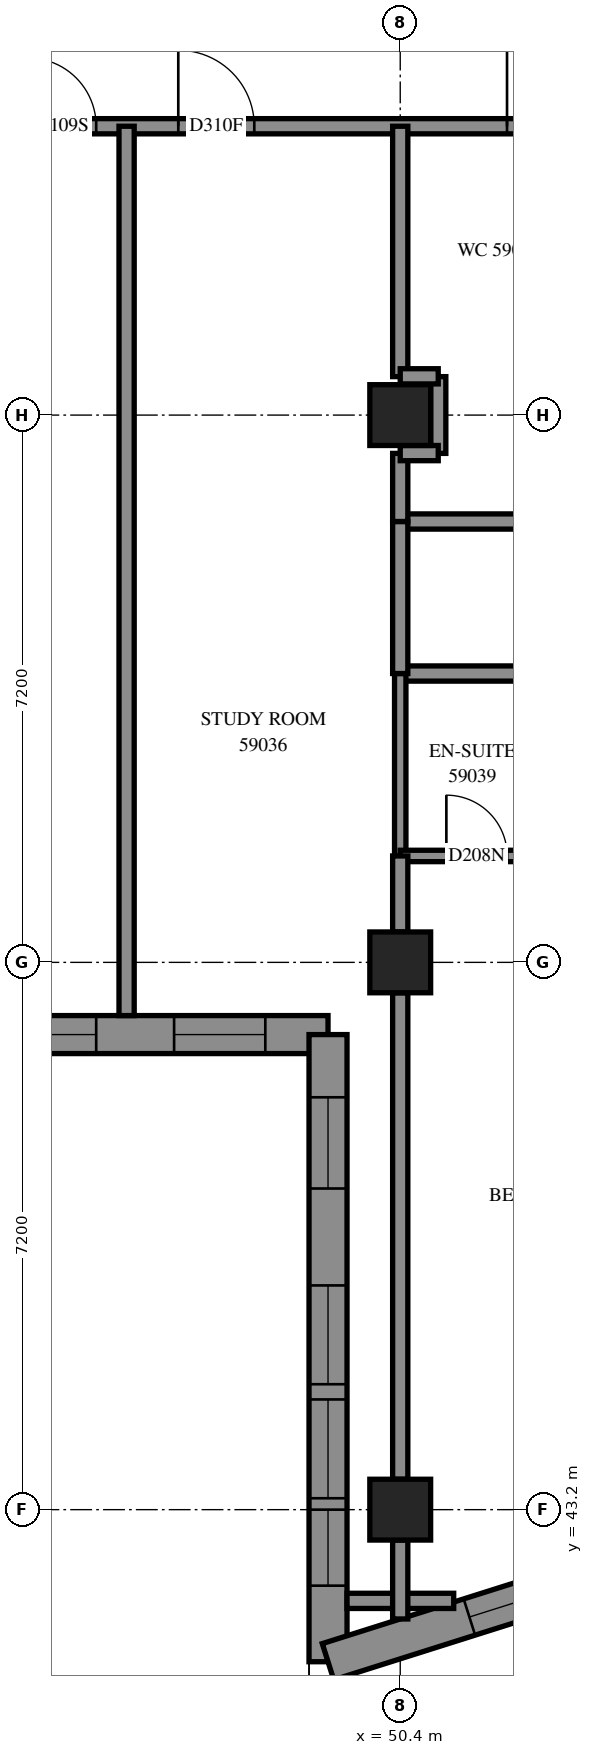
"""IFC4 building model, lengths in metres.
Left out: names, types, materials, properties, quantities, classifications, styles, units other than length and angle.
Written with IfcOpenShell. Run it as: python <this file> out.ifc"""

import sys

from ifc_helpers import new_model, si_unit, direction, frame, frame_2d, origin, origin_2d, place, context, subcontext, project, spatial, polyline, rectangle, outline, extrude, element, fill, save


model = new_model("IFC4")
c1 = context("Model", 3, precision=1e-05, world=origin(), true_north=direction((0.0, 1.0)))
c2 = subcontext(c1, "Body", "Model", "MODEL_VIEW")
j1 = project(units=[si_unit("LENGTHUNIT", "METRE"), si_unit("PLANEANGLEUNIT", "RADIAN")], contexts=[c1])
p1 = place(None, origin())
s1 = spatial("IfcSite", under=j1, at=p1, CompositionType="ELEMENT")
p2 = place(p1, origin())
s2 = spatial("IfcBuilding", under=s1, at=p2, CompositionType="ELEMENT")
p3 = place(p2, frame((0.0, 0.0, 216.8)))
s3 = spatial("IfcBuildingStorey", under=s2, at=p3, CompositionType="ELEMENT", Elevation=216.8)
for number, where, z_axis, x_axis in (
    (1, (50.4, 43.2, 0.0), (0.0, 0.0, 1.0), (1.0, 0.0, 0.0)),
    (2, (50.4, 50.4, 0.0), (0.0, 0.0, 1.0), (1.0, 0.0, 0.0)),
    (3, (50.4, 57.6, 0.0), (0.0, 0.0, 1.0), (1.0, 0.0, 0.0)),
):
    element("IfcColumn", number, at=place(p3, frame(where, z_axis=z_axis, x_axis=x_axis)), inside=s3, PredefinedType="COLUMN", context=c2, shape_type="SweptSolid", body=[
        extrude(rectangle(XDim=0.8, YDim=0.8, at=origin_2d()), origin(), (0.0, 0.0, 1.0), 3.1),
    ])
p4 = place(p3, frame((42.25, 49.45, 0.0), z_axis=(0.0, 0.0, 1.0), x_axis=(1.0, 0.0, 0.0)))
e4 = element("IfcWall", 4, at=p4, inside=s3, PredefinedType="SOLIDWALL", context=c2, shape_type="SweptSolid", body=[
    extrude(outline(polyline([(-0.25, -0.25), (6.95, -0.25), (7.45, 0.25), (0.25, 0.25), (-0.25, -0.25)])), origin(), (0.0, 0.0, 1.0), 3.1),
])
p5 = place(p4, frame((1.35, 0.0, 0.45)))
e5 = element("IfcOpeningElement", 5, at=p5, cuts=e4, PredefinedType="OPENING", context=c2, shape_type="SweptSolid", body=[
    extrude(rectangle(XDim=1.3, YDim=2.5, at=frame_2d((0.65, 1.25))), frame((0.0, 0.26, 0.0), z_axis=(0.0, -1.0, 0.0), x_axis=(1.0, 0.0, 0.0)), (0.0, 0.0, 1.0), 0.52),
])
p6 = place(p4, frame((2.85, 0.0, 0.45)))
e6 = element("IfcOpeningElement", 6, at=p6, cuts=e4, PredefinedType="OPENING", context=c2, shape_type="SweptSolid", body=[
    extrude(rectangle(XDim=1.3, YDim=2.5, at=frame_2d((0.65, 1.25))), frame((0.0, 0.26, 0.0), z_axis=(0.0, -1.0, 0.0), x_axis=(1.0, 0.0, 0.0)), (0.0, 0.0, 1.0), 0.52),
])
p7 = place(p4, frame((5.175, 0.0, 0.45)))
e7 = element("IfcOpeningElement", 7, at=p7, cuts=e4, PredefinedType="OPENING", context=c2, shape_type="SweptSolid", body=[
    extrude(rectangle(XDim=1.2, YDim=2.5, at=frame_2d((0.6, 1.25))), frame((0.0, 0.26, 0.0), z_axis=(0.0, -1.0, 0.0), x_axis=(1.0, 0.0, 0.0)), (0.0, 0.0, 1.0), 0.52),
])
p8 = place(p3, frame((49.45, 49.45, 0.0), z_axis=(0.0, 0.0, 1.0), x_axis=(0.0, -1.0, 0.0)))
e8 = element("IfcWall", 8, at=p8, inside=s3, PredefinedType="SOLIDWALL", context=c2, shape_type="SweptSolid", body=[
    extrude(outline(polyline([(0.25, -0.25), (8.592, -0.25), (7.91, 0.25), (-0.25, 0.25), (0.25, -0.25)])), origin(), (0.0, 0.0, 1.0), 3.1),
])
p9 = place(p8, frame((3.3, 0.0, 0.45)))
e9 = element("IfcOpeningElement", 9, at=p9, cuts=e8, PredefinedType="OPENING", context=c2, shape_type="SweptSolid", body=[
    extrude(rectangle(XDim=1.3, YDim=2.5, at=frame_2d((0.65, 1.25))), frame((0.0, 0.26, 0.0), z_axis=(0.0, -1.0, 0.0), x_axis=(1.0, 0.0, 0.0)), (0.0, 0.0, 1.0), 0.52),
])
p10 = place(p8, frame((4.8, 0.0, 0.45)))
e10 = element("IfcOpeningElement", 10, at=p10, cuts=e8, PredefinedType="OPENING", context=c2, shape_type="SweptSolid", body=[
    extrude(rectangle(XDim=1.3, YDim=2.5, at=frame_2d((0.65, 1.25))), frame((0.0, 0.26, 0.0), z_axis=(0.0, -1.0, 0.0), x_axis=(1.0, 0.0, 0.0)), (0.0, 0.0, 1.0), 0.52),
])
p11 = place(p8, frame((0.825, 0.0, 0.45)))
e11 = element("IfcOpeningElement", 11, at=p11, cuts=e8, PredefinedType="OPENING", context=c2, shape_type="SweptSolid", body=[
    extrude(rectangle(XDim=1.2, YDim=2.5, at=frame_2d((0.6, 1.25))), frame((0.0, 0.26, 0.0), z_axis=(0.0, -1.0, 0.0), x_axis=(1.0, 0.0, 0.0)), (0.0, 0.0, 1.0), 0.52),
])
p12 = place(p8, frame((6.25, 0.0, 0.45)))
e12 = element("IfcOpeningElement", 12, at=p12, cuts=e8, PredefinedType="OPENING", context=c2, shape_type="SweptSolid", body=[
    extrude(rectangle(XDim=1.0, YDim=2.5, at=frame_2d((0.5, 1.25))), frame((0.0, 0.26, 0.0), z_axis=(0.0, -1.0, 0.0), x_axis=(1.0, 0.0, 0.0)), (0.0, 0.0, 1.0), 0.52),
])
p13 = place(p3, frame((49.45, 41.199, 0.0), z_axis=(0.0, 0.0, 1.0), x_axis=(0.9534843061, 0.3014426612, 0.0)))
e13 = element("IfcWall", 13, at=p13, inside=s3, PredefinedType="SOLIDWALL", context=c2, shape_type="SweptSolid", body=[
    extrude(outline(polyline([(-0.341, -0.25), (3.447, -0.25), (3.563, 0.25), (0.341, 0.25), (-0.341, -0.25)])), origin(), (0.0, 0.0, 1.0), 3.1),
])
p14 = place(p13, frame((1.951, 0.0, 0.45)))
e14 = element("IfcOpeningElement", 14, at=p14, cuts=e13, PredefinedType="OPENING", context=c2, shape_type="SweptSolid", body=[
    extrude(rectangle(XDim=1.2, YDim=2.5, at=frame_2d((0.6, 1.25))), frame((0.0, 0.26, 0.0), z_axis=(0.0, -1.0, 0.0), x_axis=(1.0, 0.0, 0.0)), (0.0, 0.0, 1.0), 0.52),
])
p15 = place(p3, frame((36.0, 61.4, 0.0), z_axis=(0.0, 0.0, 1.0), x_axis=(1.0, 0.0, 0.0)))
e15 = element("IfcWall", 15, at=p15, inside=s3, PredefinedType="PARTITIONING", context=c2, shape_type="SweptSolid", body=[
    extrude(rectangle(XDim=17.0, YDim=0.2, at=frame_2d((8.5, 0.0))), origin(), (0.0, 0.0, 1.0), 3.1),
])
p16 = place(p15, frame((2.3, 0.0, 0.0)))
e16 = element("IfcOpeningElement", 16, at=p16, cuts=e15, PredefinedType="OPENING", context=c2, shape_type="SweptSolid", body=[
    extrude(rectangle(XDim=0.9, YDim=2.1, at=frame_2d((0.45, 1.05))), frame((0.0, 0.11, 0.0), z_axis=(0.0, -1.0, 0.0), x_axis=(1.0, 0.0, 0.0)), (0.0, 0.0, 1.0), 0.22),
])
p17 = place(p15, frame((4.107, 0.0, 0.0)))
e17 = element("IfcOpeningElement", 17, at=p17, cuts=e15, PredefinedType="OPENING", context=c2, shape_type="SweptSolid", body=[
    extrude(rectangle(XDim=1.0, YDim=2.1, at=frame_2d((0.5, 1.05))), frame((0.0, 0.11, 0.0), z_axis=(0.0, -1.0, 0.0), x_axis=(1.0, 0.0, 0.0)), (0.0, 0.0, 1.0), 0.22),
])
p18 = place(p15, frame((9.5, 0.0, 0.0)))
e18 = element("IfcOpeningElement", 18, at=p18, cuts=e15, PredefinedType="OPENING", context=c2, shape_type="SweptSolid", body=[
    extrude(rectangle(XDim=0.9, YDim=2.1, at=frame_2d((0.45, 1.05))), frame((0.0, 0.11, 0.0), z_axis=(0.0, -1.0, 0.0), x_axis=(1.0, 0.0, 0.0)), (0.0, 0.0, 1.0), 0.22),
])
p19 = place(p15, frame((11.48, 0.0, 0.0)))
e19 = element("IfcOpeningElement", 19, at=p19, cuts=e15, PredefinedType="OPENING", context=c2, shape_type="SweptSolid", body=[
    extrude(rectangle(XDim=1.0, YDim=2.1, at=frame_2d((0.5, 1.05))), frame((0.0, 0.11, 0.0), z_axis=(0.0, -1.0, 0.0), x_axis=(1.0, 0.0, 0.0)), (0.0, 0.0, 1.0), 0.22),
])
p20 = place(p15, frame((15.805, 0.0, 0.0)))
e20 = element("IfcOpeningElement", 20, at=p20, cuts=e15, PredefinedType="OPENING", context=c2, shape_type="SweptSolid", body=[
    extrude(rectangle(XDim=1.0, YDim=2.1, at=frame_2d((0.5, 1.05))), frame((0.0, 0.11, 0.0), z_axis=(0.0, -1.0, 0.0), x_axis=(1.0, 0.0, 0.0)), (0.0, 0.0, 1.0), 0.22),
])
p21 = place(p3, frame((46.8, 49.7, 0.0), z_axis=(0.0, 0.0, 1.0), x_axis=(0.0, 1.0, 0.0)))
e21 = element("IfcWall", 21, at=p21, inside=s3, PredefinedType="PARTITIONING", context=c2, shape_type="SweptSolid", body=[
    extrude(rectangle(XDim=11.7, YDim=0.2, at=frame_2d((5.85, 0.0))), origin(), (0.0, 0.0, 1.0), 3.1),
])
p22 = place(p3, frame((50.4, 43.6, 0.0), z_axis=(0.0, 0.0, 1.0), x_axis=(0.0, 1.0, 0.0)))
e22 = element("IfcWall", 22, at=p22, inside=s3, PredefinedType="PARTITIONING", context=c2, shape_type="SweptSolid", body=[
    extrude(rectangle(XDim=6.4, YDim=0.2, at=frame_2d((3.2, 0.0))), origin(), (0.0, 0.0, 1.0), 2.6),
])
p23 = place(p3, frame((50.4, 54.2, 0.0), z_axis=(0.0, 0.0, 1.0), x_axis=(1.0, 0.0, 0.0)))
e23 = element("IfcWall", 23, at=p23, inside=s3, PredefinedType="PARTITIONING", context=c2, shape_type="SweptSolid", body=[
    extrude(rectangle(XDim=4.6, YDim=0.2, at=frame_2d((2.3, 0.0))), origin(), (0.0, 0.0, 1.0), 3.1),
])
p24 = place(p23, frame((2.3, 0.0, 0.0)))
e24 = element("IfcOpeningElement", 24, at=p24, cuts=e23, PredefinedType="OPENING", context=c2, shape_type="SweptSolid", body=[
    extrude(rectangle(XDim=0.9, YDim=2.1, at=frame_2d((0.45, 1.05))), frame((0.0, 0.11, 0.0), z_axis=(0.0, -1.0, 0.0), x_axis=(1.0, 0.0, 0.0)), (0.0, 0.0, 1.0), 0.22),
])
p25 = place(p3, frame((50.4, 58.106, 0.0), z_axis=(0.0, 0.0, 1.0), x_axis=(0.0, 1.0, 0.0)))
e25 = element("IfcWall", 25, at=p25, inside=s3, PredefinedType="PARTITIONING", context=c2, shape_type="SweptSolid", body=[
    extrude(rectangle(XDim=3.294, YDim=0.2, at=frame_2d((1.647, 0.0))), origin(), (0.0, 0.0, 1.0), 3.1),
])
p26 = place(p3, frame((50.4, 56.2, 0.0), z_axis=(0.0, 0.0, 1.0), x_axis=(1.0, 0.0, 0.0)))
e26 = element("IfcWall", 26, at=p26, inside=s3, PredefinedType="PARTITIONING", context=c2, shape_type="SweptSolid", body=[
    extrude(rectangle(XDim=2.6, YDim=0.2, at=frame_2d((1.3, 0.0))), origin(), (0.0, 0.0, 1.0), 3.1),
])
p27 = place(p3, frame((50.4, 51.8, 0.0), z_axis=(0.0, 0.0, 1.0), x_axis=(0.0, 1.0, 0.0)))
e27 = element("IfcWall", 27, at=p27, inside=s3, PredefinedType="PARTITIONING", context=c2, shape_type="SweptSolid", body=[
    extrude(rectangle(XDim=2.4, YDim=0.15, at=frame_2d((1.2, 0.0))), origin(), (0.0, 0.0, 1.0), 3.1),
])
p28 = place(p3, frame((50.4, 54.2, 0.0), z_axis=(0.0, 0.0, 1.0), x_axis=(0.0, 1.0, 0.0)))
e28 = element("IfcWall", 28, at=p28, inside=s3, PredefinedType="PARTITIONING", context=c2, shape_type="SweptSolid", body=[
    extrude(rectangle(XDim=2.0, YDim=0.2, at=frame_2d((1.0, 0.0))), origin(), (0.0, 0.0, 1.0), 3.1),
])
p29 = place(p3, frame((50.4, 51.8, 0.0), z_axis=(0.0, 0.0, 1.0), x_axis=(1.0, 0.0, 0.0)))
e29 = element("IfcWall", 29, at=p29, inside=s3, PredefinedType="PARTITIONING", context=c2, shape_type="SweptSolid", body=[
    extrude(rectangle(XDim=1.9, YDim=0.15, at=frame_2d((0.95, 0.0))), origin(), (0.0, 0.0, 1.0), 3.1),
])
p30 = place(p29, frame((0.607, 0.0, 0.0)))
e30 = element("IfcOpeningElement", 30, at=p30, cuts=e29, PredefinedType="OPENING", context=c2, shape_type="SweptSolid", body=[
    extrude(rectangle(XDim=0.8, YDim=2.1, at=frame_2d((0.4, 1.05))), frame((0.0, 0.085, 0.0), z_axis=(0.0, -1.0, 0.0), x_axis=(1.0, 0.0, 0.0)), (0.0, 0.0, 1.0), 0.17),
])
p31 = place(p3, frame((49.7, 42.0, 0.0), z_axis=(0.0, 0.0, 1.0), x_axis=(1.0, 0.0, 0.0)))
e31 = element("IfcWall", 31, at=p31, inside=s3, PredefinedType="PARTITIONING", context=c2, shape_type="SweptSolid", body=[
    extrude(rectangle(XDim=1.403, YDim=0.2, at=frame_2d((0.702, 0.0))), origin(), (0.0, 0.0, 1.0), 3.1),
])
p32 = place(p3, frame((50.9, 57.096, 0.0), z_axis=(0.0, 0.0, 1.0), x_axis=(0.0, 1.0, 0.0)))
e32 = element("IfcWall", 32, at=p32, inside=s3, PredefinedType="PARTITIONING", context=c2, shape_type="SweptSolid", body=[
    extrude(rectangle(XDim=1.01, YDim=0.2, at=frame_2d((0.505, 0.0))), origin(), (0.0, 0.0, 1.0), 3.1),
])
p33 = place(p3, frame((50.4, 50.8, 0.0), z_axis=(0.0, 0.0, 1.0), x_axis=(0.0, 1.0, 0.0)))
e33 = element("IfcWall", 33, at=p33, inside=s3, PredefinedType="PARTITIONING", context=c2, shape_type="SweptSolid", body=[
    extrude(rectangle(XDim=1.0, YDim=0.2, at=frame_2d((0.5, 0.0))), origin(), (0.0, 0.0, 1.0), 3.1),
])
p34 = place(p3, frame((50.4, 56.2, 0.0), z_axis=(0.0, 0.0, 1.0), x_axis=(0.0, 1.0, 0.0)))
e34 = element("IfcWall", 34, at=p34, inside=s3, PredefinedType="PARTITIONING", context=c2, shape_type="SweptSolid", body=[
    extrude(rectangle(XDim=0.896, YDim=0.2, at=frame_2d((0.448, 0.0))), origin(), (0.0, 0.0, 1.0), 3.1),
])
p35 = place(p3, frame((50.4, 41.762, 0.0), z_axis=(0.0, 0.0, 1.0), x_axis=(0.0, 1.0, 0.0)))
e35 = element("IfcWall", 35, at=p35, inside=s3, PredefinedType="PARTITIONING", context=c2, shape_type="SweptSolid", body=[
    extrude(rectangle(XDim=1.038, YDim=0.2, at=frame_2d((0.519, 0.0))), origin(), (0.0, 0.0, 1.0), 3.1),
])
for number, where, z_axis, x_axis in (
    (36, (50.4, 58.11, 0.0), (0.0, 0.0, 1.0), (1.0, 0.0, 0.0)),
    (37, (50.4, 57.1, 0.0), (0.0, 0.0, 1.0), (1.0, 0.0, 0.0)),
):
    element("IfcWall", number, at=place(p3, frame(where, z_axis=z_axis, x_axis=x_axis)), inside=s3, PredefinedType="PARTITIONING", context=c2, shape_type="SweptSolid", body=[
        extrude(rectangle(XDim=0.5, YDim=0.2, at=frame_2d((0.25, 0.0))), origin(), (0.0, 0.0, 1.0), 3.1),
    ])
p36 = place(p6, origin())
e38 = element("IfcWindow", 38, at=p36, inside=s3, PartitioningType="SINGLE_PANEL", PredefinedType="WINDOW", context=c2, shape_type="SweptSolid", body=[
    extrude(rectangle(XDim=1.3, YDim=2.5, at=frame_2d((0.65, 1.25))), frame((0.0, 0.18, 0.0), z_axis=(0.0, -1.0, 0.0), x_axis=(1.0, 0.0, 0.0)), (0.0, 0.0, 1.0), 0.06),
])
fill(e6, e38)
p37 = place(p7, origin())
e39 = element("IfcWindow", 39, at=p37, inside=s3, PartitioningType="SINGLE_PANEL", PredefinedType="WINDOW", context=c2, shape_type="SweptSolid", body=[
    extrude(rectangle(XDim=1.2, YDim=2.5, at=frame_2d((0.6, 1.25))), frame((0.0, 0.18, 0.0), z_axis=(0.0, -1.0, 0.0), x_axis=(1.0, 0.0, 0.0)), (0.0, 0.0, 1.0), 0.06),
])
fill(e7, e39)
p38 = place(p9, origin())
e40 = element("IfcWindow", 40, at=p38, inside=s3, PartitioningType="SINGLE_PANEL", PredefinedType="WINDOW", context=c2, shape_type="SweptSolid", body=[
    extrude(rectangle(XDim=1.3, YDim=2.5, at=frame_2d((0.65, 1.25))), frame((0.0, 0.18, 0.0), z_axis=(0.0, -1.0, 0.0), x_axis=(1.0, 0.0, 0.0)), (0.0, 0.0, 1.0), 0.06),
])
fill(e9, e40)
p39 = place(p10, origin())
e41 = element("IfcWindow", 41, at=p39, inside=s3, PartitioningType="SINGLE_PANEL", PredefinedType="WINDOW", context=c2, shape_type="SweptSolid", body=[
    extrude(rectangle(XDim=1.3, YDim=2.5, at=frame_2d((0.65, 1.25))), frame((0.0, 0.18, 0.0), z_axis=(0.0, -1.0, 0.0), x_axis=(1.0, 0.0, 0.0)), (0.0, 0.0, 1.0), 0.06),
])
fill(e10, e41)
p40 = place(p11, origin())
e42 = element("IfcWindow", 42, at=p40, inside=s3, PartitioningType="SINGLE_PANEL", PredefinedType="WINDOW", context=c2, shape_type="SweptSolid", body=[
    extrude(rectangle(XDim=1.2, YDim=2.5, at=frame_2d((0.6, 1.25))), frame((0.0, 0.18, 0.0), z_axis=(0.0, -1.0, 0.0), x_axis=(1.0, 0.0, 0.0)), (0.0, 0.0, 1.0), 0.06),
])
fill(e11, e42)
p41 = place(p14, origin())
e43 = element("IfcWindow", 43, at=p41, inside=s3, PartitioningType="SINGLE_PANEL", PredefinedType="WINDOW", context=c2, shape_type="SweptSolid", body=[
    extrude(rectangle(XDim=1.2, YDim=2.5, at=frame_2d((0.6, 1.25))), frame((0.0, 0.18, 0.0), z_axis=(0.0, -1.0, 0.0), x_axis=(1.0, 0.0, 0.0)), (0.0, 0.0, 1.0), 0.06),
])
fill(e14, e43)
p42 = place(p18, origin())
e44 = element("IfcDoor", 44, at=p42, inside=s3, OperationType="SINGLE_SWING_LEFT", PredefinedType="DOOR", context=c2, shape_type="SweptSolid", body=[
    extrude(rectangle(XDim=0.9, YDim=2.1, at=frame_2d((0.45, 1.05))), frame((0.0, 0.025, 0.0), z_axis=(0.0, -1.0, 0.0), x_axis=(1.0, 0.0, 0.0)), (0.0, 0.0, 1.0), 0.05),
])
fill(e18, e44)
p43 = place(p19, origin())
e45 = element("IfcDoor", 45, at=p43, inside=s3, OperationType="SINGLE_SWING_RIGHT", PredefinedType="DOOR", context=c2, shape_type="SweptSolid", body=[
    extrude(rectangle(XDim=1.0, YDim=2.1, at=frame_2d((0.5, 1.05))), frame((0.0, 0.025, 0.0), z_axis=(0.0, -1.0, 0.0), x_axis=(1.0, 0.0, 0.0)), (0.0, 0.0, 1.0), 0.05),
])
fill(e19, e45)
p44 = place(p20, origin())
e46 = element("IfcDoor", 46, at=p44, inside=s3, OperationType="SINGLE_SWING_LEFT", PredefinedType="DOOR", context=c2, shape_type="SweptSolid", body=[
    extrude(rectangle(XDim=1.0, YDim=2.1, at=frame_2d((0.5, 1.05))), frame((0.0, 0.025, 0.0), z_axis=(0.0, -1.0, 0.0), x_axis=(1.0, 0.0, 0.0)), (0.0, 0.0, 1.0), 0.05),
])
fill(e20, e46)
p45 = place(p30, origin())
e47 = element("IfcDoor", 47, at=p45, inside=s3, OperationType="SINGLE_SWING_RIGHT", PredefinedType="DOOR", context=c2, shape_type="SweptSolid", body=[
    extrude(rectangle(XDim=0.8, YDim=2.1, at=frame_2d((0.4, 1.05))), frame((0.0, 0.025, 0.0), z_axis=(0.0, -1.0, 0.0), x_axis=(1.0, 0.0, 0.0)), (0.0, 0.0, 1.0), 0.05),
])
fill(e30, e47)
p46 = place(p12, origin())
e48 = element("IfcWindow", 48, at=p46, inside=s3, PartitioningType="SINGLE_PANEL", PredefinedType="WINDOW", context=c2, shape_type="SweptSolid", body=[
    extrude(rectangle(XDim=1.0, YDim=2.5, at=frame_2d((0.5, 1.25))), frame((0.0, 0.18, 0.0), z_axis=(0.0, -1.0, 0.0), x_axis=(1.0, 0.0, 0.0)), (0.0, 0.0, 1.0), 0.06),
])
fill(e12, e48)
save(model, sys.argv[1])
